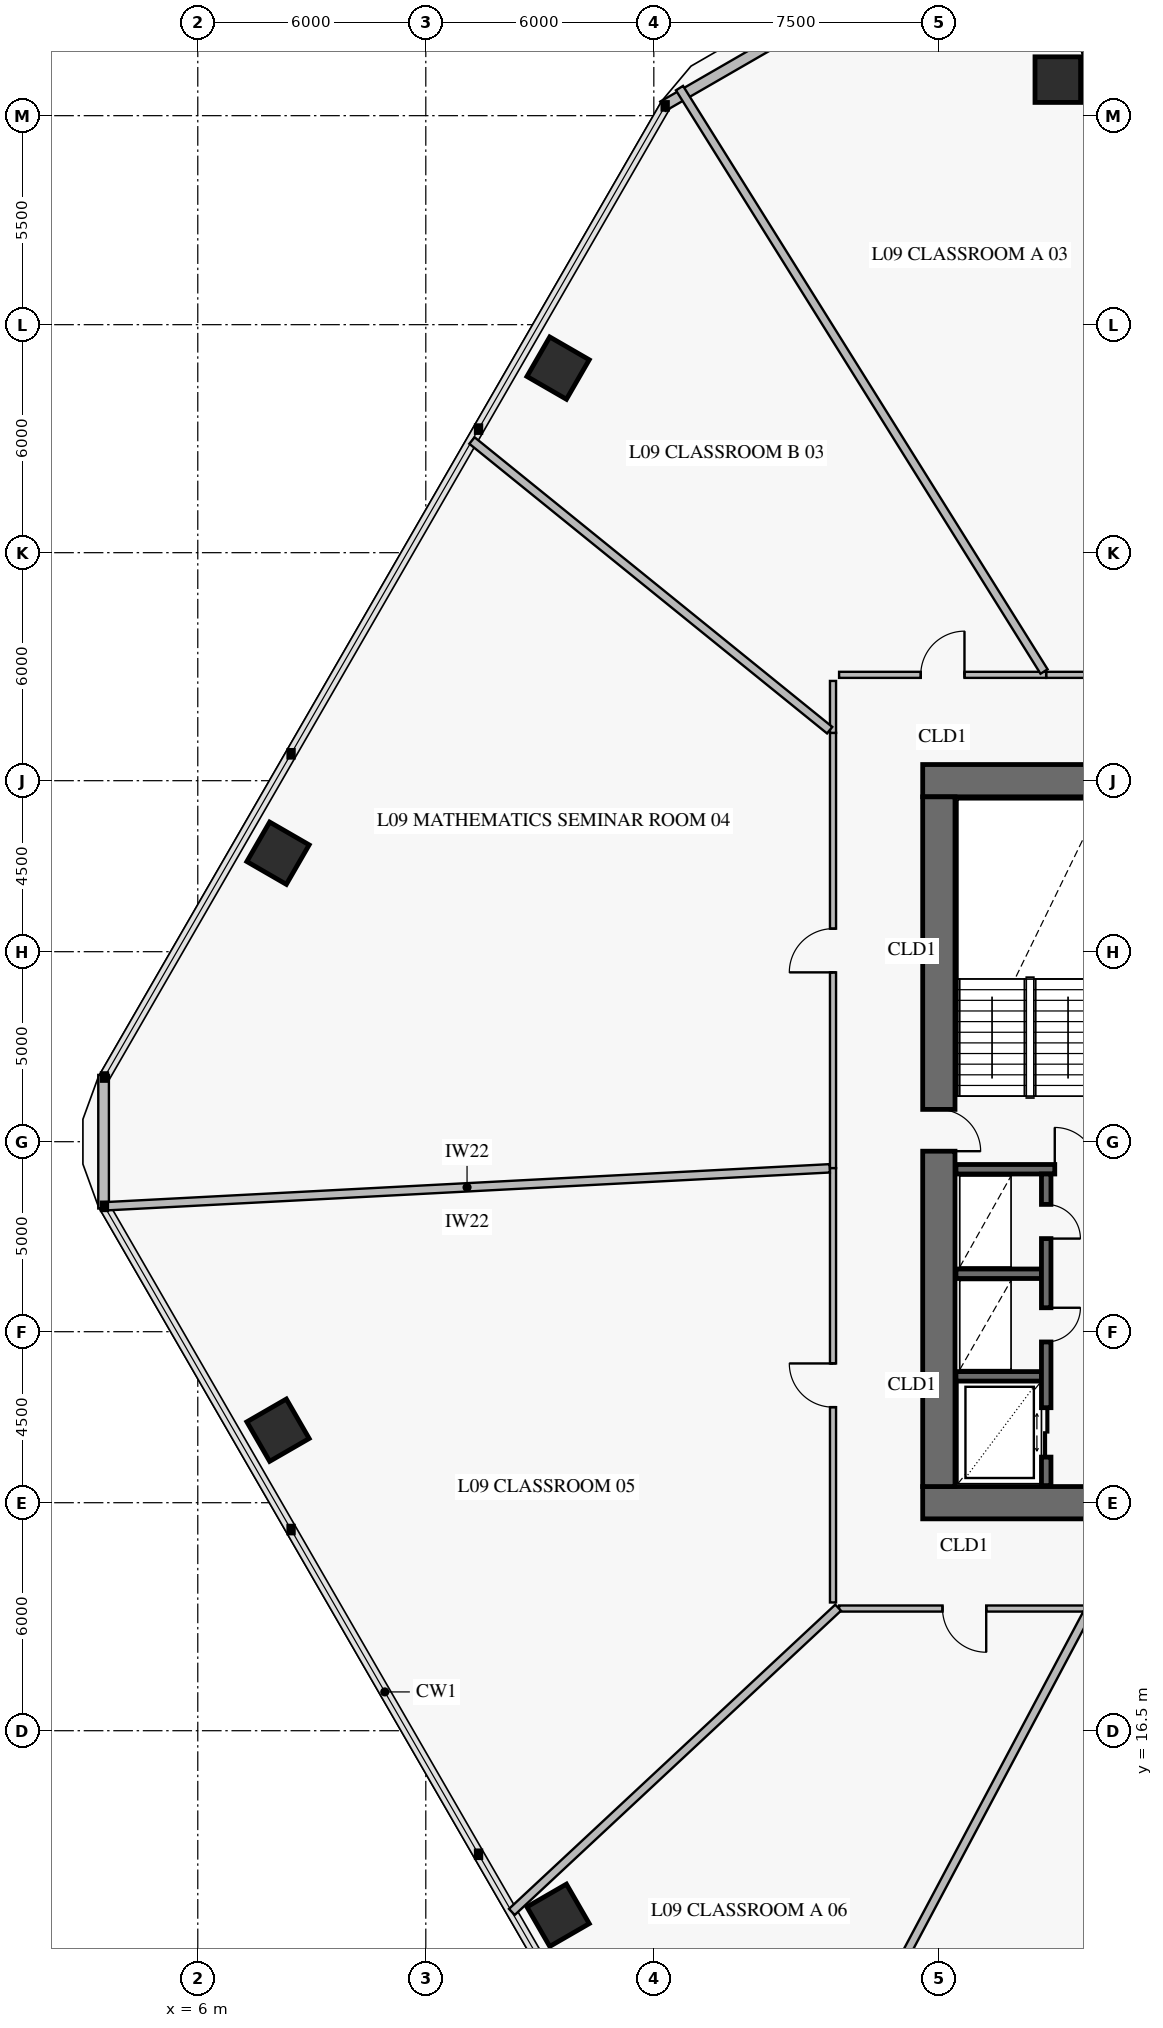
"""IFC4 building model, lengths in metres.
Left out: names, types, materials, properties, quantities, classifications, styles, units other than length and angle.
Written with IfcOpenShell. Run it as: python <this file> out.ifc"""

import sys

from ifc_helpers import new_model, si_unit, direction, frame, frame_2d, origin, origin_2d, place, context, subcontext, project, spatial, rectangle, extrude, element, fill, save


model = new_model("IFC4")
c1 = context("Model", 3, precision=1e-05, world=origin(), true_north=direction((0.0, 1.0)))
c2 = subcontext(c1, "Body", "Model", "MODEL_VIEW")
j1 = project(units=[si_unit("LENGTHUNIT", "METRE"), si_unit("PLANEANGLEUNIT", "RADIAN")], contexts=[c1])
p1 = place(None, origin())
s1 = spatial("IfcSite", under=j1, at=p1, CompositionType="ELEMENT")
p2 = place(p1, origin())
s2 = spatial("IfcBuilding", under=s1, at=p2, CompositionType="ELEMENT")
p3 = place(p2, frame((0.0, 0.0, 37.2)))
s3 = spatial("IfcBuildingStorey", under=s2, at=p3, CompositionType="ELEMENT", Elevation=37.2)
p4 = place(p3, frame((25.075, 22.5, 0.0), z_axis=(0.0, 0.0, 1.0), x_axis=(1.0, 0.0, 0.0)))
e1 = element("IfcWall", 1, at=p4, inside=s3, PredefinedType="SHEAR", context=c2, shape_type="SweptSolid", body=[
    extrude(rectangle(XDim=9.975, YDim=0.85, at=frame_2d((4.988, 0.0))), origin(), (0.0, 0.0, 1.0), 4.2),
])
p5 = place(p4, frame((4.325, 0.0, 0.0)))
e2 = element("IfcOpeningElement", 2, at=p5, cuts=e1, PredefinedType="OPENING", context=c2, shape_type="SweptSolid", body=[
    extrude(rectangle(XDim=1.5, YDim=2.15, at=frame_2d((0.75, 1.075))), frame((0.0, 0.437, 0.0), z_axis=(0.0, -1.0, 0.0), x_axis=(1.0, 0.0, 0.0)), (0.0, 0.0, 1.0), 0.874),
])
p6 = place(p3, frame((36.75, 41.5, 0.0), z_axis=(0.0, 0.0, 1.0), x_axis=(-1.0, 0.0, 0.0)))
e3 = element("IfcWall", 3, at=p6, inside=s3, PredefinedType="SHEAR", context=c2, shape_type="SweptSolid", body=[
    extrude(rectangle(XDim=11.675, YDim=0.85, at=frame_2d((5.837, 0.0))), origin(), (0.0, 0.0, 1.0), 4.2),
])
p7 = place(p6, frame((4.25, 0.0, 0.0)))
e4 = element("IfcOpeningElement", 4, at=p7, cuts=e3, PredefinedType="OPENING", context=c2, shape_type="SweptSolid", body=[
    extrude(rectangle(XDim=1.1, YDim=2.15, at=frame_2d((0.55, 1.075))), frame((0.0, 0.437, 0.0), z_axis=(0.0, -1.0, 0.0), x_axis=(1.0, 0.0, 0.0)), (0.0, 0.0, 1.0), 0.874),
])
p8 = place(p3, frame((25.5, 22.925, 0.0), z_axis=(0.0, 0.0, 1.0), x_axis=(0.0, 1.0, 0.0)))
e5 = element("IfcWall", 5, at=p8, inside=s3, PredefinedType="SHEAR", context=c2, shape_type="SweptSolid", body=[
    extrude(rectangle(XDim=18.15, YDim=0.85, at=frame_2d((9.075, 0.0))), origin(), (0.0, 0.0, 1.0), 4.2),
])
p9 = place(p8, frame((8.825, 0.0, 0.0)))
e6 = element("IfcOpeningElement", 6, at=p9, cuts=e5, PredefinedType="OPENING", context=c2, shape_type="SweptSolid", body=[
    extrude(rectangle(XDim=1.1, YDim=2.15, at=frame_2d((0.55, 1.075))), frame((0.0, 0.437, 0.0), z_axis=(0.0, -1.0, 0.0), x_axis=(1.0, 0.0, 0.0)), (0.0, 0.0, 1.0), 0.874),
])
for number, where, z_axis, x_axis in (
    (7, (28.63, 59.948, 0.0), (0.0, 0.0, 1.0), (-1.0, 0.0, 0.0)),
    (8, (15.481, 52.357, 0.0), (0.0, 0.0, 1.0), (-0.5, -0.866, 0.0)),
    (9, (8.111, 39.592, 0.0), (0.0, 0.0, 1.0), (-0.5, -0.866, 0.0)),
    (10, (8.111, 24.408, 0.0), (0.0, 0.0, 1.0), (0.5, -0.866, 0.0)),
    (11, (15.481, 11.643, 0.0), (0.0, 0.0, 1.0), (0.5, -0.866, 0.0)),
):
    element("IfcColumn", number, at=place(p3, frame(where, z_axis=z_axis, x_axis=x_axis)), inside=s3, PredefinedType="COLUMN", context=c2, shape_type="SweptSolid", body=[
        extrude(rectangle(XDim=1.2, YDim=1.2, at=origin_2d()), origin(), (0.0, 0.0, 1.0), 3.92),
    ])
p10 = place(p3, frame((3.521, 30.242, 0.0), z_axis=(0.0, 0.0, 1.0), x_axis=(0.0, 1.0, 0.0)))
e12 = element("IfcWall", 12, at=p10, inside=s3, PredefinedType="SOLIDWALL", context=c2, shape_type="SweptSolid", body=[
    extrude(rectangle(XDim=3.515, YDim=0.28, at=frame_2d((1.758, 0.0))), origin(), (0.0, 0.0, 1.0), 3.92),
])
p11 = place(p3, frame((18.239, 59.249, 0.0), z_axis=(0.0, 0.0, 1.0), x_axis=(0.866007452331, 0.500031091541, 0.0)))
e13 = element("IfcWall", 13, at=p11, inside=s3, PredefinedType="SOLIDWALL", context=c2, shape_type="SweptSolid", body=[
    extrude(rectangle(XDim=3.515, YDim=0.28, at=frame_2d((1.757, 0.0))), origin(), (0.0, 0.0, 1.0), 3.92),
])
p12 = place(p3, frame((25.95, 31.275, 0.0), z_axis=(0.0, 0.0, 1.0), x_axis=(1.0, 0.0, 0.0)))
e14 = element("IfcWall", 14, at=p12, inside=s3, PredefinedType="SOLIDWALL", context=c2, shape_type="SweptSolid", body=[
    extrude(rectangle(XDim=20.1, YDim=0.25, at=frame_2d((10.05, 0.0))), origin(), (0.0, 0.0, 1.0), 4.2),
])
p13 = place(p12, frame((2.6, 0.0, 0.0)))
e15 = element("IfcOpeningElement", 15, at=p13, cuts=e14, PredefinedType="OPENING", context=c2, shape_type="SweptSolid", body=[
    extrude(rectangle(XDim=1.1, YDim=2.15, at=frame_2d((0.55, 1.075))), frame((0.0, 0.137, 0.0), z_axis=(0.0, -1.0, 0.0), x_axis=(1.0, 0.0, 0.0)), (0.0, 0.0, 1.0), 0.274),
])
p14 = place(p12, frame((10.6, 0.0, 0.0)))
e16 = element("IfcOpeningElement", 16, at=p14, cuts=e14, PredefinedType="OPENING", context=c2, shape_type="SweptSolid", body=[
    extrude(rectangle(XDim=1.1, YDim=2.15, at=frame_2d((0.55, 1.075))), frame((0.0, 0.137, 0.0), z_axis=(0.0, -1.0, 0.0), x_axis=(1.0, 0.0, 0.0)), (0.0, 0.0, 1.0), 0.274),
])
p15 = place(p12, frame((16.35, 0.0, 0.0)))
e17 = element("IfcOpeningElement", 17, at=p15, cuts=e14, PredefinedType="OPENING", context=c2, shape_type="SweptSolid", body=[
    extrude(rectangle(XDim=1.1, YDim=2.15, at=frame_2d((0.55, 1.075))), frame((0.0, 0.137, 0.0), z_axis=(0.0, -1.0, 0.0), x_axis=(1.0, 0.0, 0.0)), (0.0, 0.0, 1.0), 0.274),
])
for number, where, z_axis, x_axis in (
    (18, (25.95, 25.825, 0.0), (0.0, 0.0, 1.0), (1.0, 0.0, 0.0)),
    (19, (25.95, 28.525, 0.0), (0.0, 0.0, 1.0), (1.0, 0.0, 0.0)),
):
    element("IfcWall", number, at=place(p3, frame(where, z_axis=z_axis, x_axis=x_axis)), inside=s3, PredefinedType="SOLIDWALL", context=c2, shape_type="SweptSolid", body=[
        extrude(rectangle(XDim=2.25, YDim=0.25, at=frame_2d((1.125, 0.0))), origin(), (0.0, 0.0, 1.0), 4.2),
    ])
p16 = place(p3, frame((28.325, 22.95, 0.0), z_axis=(0.0, 0.0, 1.0), x_axis=(0.0, 1.0, 0.0)))
e20 = element("IfcWall", 20, at=p16, inside=s3, PredefinedType="SOLIDWALL", context=c2, shape_type="SweptSolid", body=[
    extrude(rectangle(XDim=8.2, YDim=0.25, at=frame_2d((4.1, 0.0))), origin(), (0.0, 0.0, 1.0), 4.2),
])
p17 = place(p16, frame((0.75, 0.0, 0.0)))
e21 = element("IfcOpeningElement", 21, at=p17, cuts=e20, PredefinedType="OPENING", context=c2, shape_type="SweptSolid", body=[
    extrude(rectangle(XDim=1.3, YDim=2.3, at=frame_2d((0.65, 1.15))), frame((0.0, 0.137, 0.0), z_axis=(0.0, -1.0, 0.0), x_axis=(1.0, 0.0, 0.0)), (0.0, 0.0, 1.0), 0.274),
])
p18 = place(p16, frame((3.78, 0.0, 0.0)))
e22 = element("IfcOpeningElement", 22, at=p18, cuts=e20, PredefinedType="OPENING", context=c2, shape_type="SweptSolid", body=[
    extrude(rectangle(XDim=0.9, YDim=2.1, at=frame_2d((0.45, 1.05))), frame((0.0, 0.137, 0.0), z_axis=(0.0, -1.0, 0.0), x_axis=(1.0, 0.0, 0.0)), (0.0, 0.0, 1.0), 0.274),
])
p19 = place(p16, frame((6.5, 0.0, 0.0)))
e23 = element("IfcOpeningElement", 23, at=p19, cuts=e20, PredefinedType="OPENING", context=c2, shape_type="SweptSolid", body=[
    extrude(rectangle(XDim=0.9, YDim=2.1, at=frame_2d((0.45, 1.05))), frame((0.0, 0.137, 0.0), z_axis=(0.0, -1.0, 0.0), x_axis=(1.0, 0.0, 0.0)), (0.0, 0.0, 1.0), 0.274),
])
p20 = place(p3, frame((33.164, 44.285, 0.0), z_axis=(0.0, 0.0, 1.0), x_axis=(-1.0, 0.0, 0.0)))
e24 = element("IfcWall", 24, at=p20, inside=s3, PredefinedType="PARTITIONING", context=c2, shape_type="SweptSolid", body=[
    extrude(rectangle(XDim=4.84, YDim=0.16, at=frame_2d((2.42, 0.0))), origin(), (0.0, 0.0, 1.0), 3.22),
])
p21 = place(p20, frame((1.845, 0.0, 0.0)))
e25 = element("IfcOpeningElement", 25, at=p21, cuts=e24, PredefinedType="OPENING", context=c2, shape_type="SweptSolid", body=[
    extrude(rectangle(XDim=1.15, YDim=2.2, at=frame_2d((0.575, 1.1))), frame((0.0, 0.092, 0.0), z_axis=(0.0, -1.0, 0.0), x_axis=(1.0, 0.0, 0.0)), (0.0, 0.0, 1.0), 0.184),
])
p22 = place(p3, frame((28.323, 44.285, 0.0), z_axis=(0.0, 0.0, 1.0), x_axis=(-1.0, 0.0, 0.0)))
e26 = element("IfcWall", 26, at=p22, inside=s3, PredefinedType="PARTITIONING", context=c2, shape_type="SweptSolid", body=[
    extrude(rectangle(XDim=5.448, YDim=0.16, at=frame_2d((2.724, 0.0))), origin(), (0.0, 0.0, 1.0), 3.22),
])
p23 = place(p22, frame((2.149, 0.0, 0.0)))
e27 = element("IfcOpeningElement", 27, at=p23, cuts=e26, PredefinedType="OPENING", context=c2, shape_type="SweptSolid", body=[
    extrude(rectangle(XDim=1.15, YDim=2.2, at=frame_2d((0.575, 1.1))), frame((0.0, 0.092, 0.0), z_axis=(0.0, -1.0, 0.0), x_axis=(1.0, 0.0, 0.0)), (0.0, 0.0, 1.0), 0.184),
])
p24 = place(p3, frame((22.715, 42.758, 0.0), z_axis=(0.0, 0.0, 1.0), x_axis=(0.0, -1.0, 0.0)))
e28 = element("IfcWall", 28, at=p24, inside=s3, PredefinedType="PARTITIONING", context=c2, shape_type="SweptSolid", body=[
    extrude(rectangle(XDim=11.454, YDim=0.16, at=frame_2d((5.727, 0.0))), origin(), (0.0, 0.0, 1.0), 3.22),
])
p25 = place(p24, frame((5.152, 0.0, 0.0)))
e29 = element("IfcOpeningElement", 29, at=p25, cuts=e28, PredefinedType="OPENING", context=c2, shape_type="SweptSolid", body=[
    extrude(rectangle(XDim=1.15, YDim=2.2, at=frame_2d((0.575, 1.1))), frame((0.0, 0.092, 0.0), z_axis=(0.0, -1.0, 0.0), x_axis=(1.0, 0.0, 0.0)), (0.0, 0.0, 1.0), 0.184),
])
p26 = place(p3, frame((22.715, 31.304, 0.0), z_axis=(0.0, 0.0, 1.0), x_axis=(0.0, -1.0, 0.0)))
e30 = element("IfcWall", 30, at=p26, inside=s3, PredefinedType="PARTITIONING", context=c2, shape_type="SweptSolid", body=[
    extrude(rectangle(XDim=11.429, YDim=0.16, at=frame_2d((5.714, 0.0))), origin(), (0.0, 0.0, 1.0), 3.22),
])
p27 = place(p26, frame((5.139, 0.0, 0.0)))
e31 = element("IfcOpeningElement", 31, at=p27, cuts=e30, PredefinedType="OPENING", context=c2, shape_type="SweptSolid", body=[
    extrude(rectangle(XDim=1.15, YDim=2.2, at=frame_2d((0.575, 1.1))), frame((0.0, 0.092, 0.0), z_axis=(0.0, -1.0, 0.0), x_axis=(1.0, 0.0, 0.0)), (0.0, 0.0, 1.0), 0.184),
])
p28 = place(p3, frame((22.875, 19.715, 0.0), z_axis=(0.0, 0.0, 1.0), x_axis=(1.0, 0.0, 0.0)))
e32 = element("IfcWall", 32, at=p28, inside=s3, PredefinedType="PARTITIONING", context=c2, shape_type="SweptSolid", body=[
    extrude(rectangle(XDim=6.593, YDim=0.16, at=frame_2d((3.296, 0.0))), origin(), (0.0, 0.0, 1.0), 3.22),
])
p29 = place(p28, frame((2.721, 0.0, 0.0)))
e33 = element("IfcOpeningElement", 33, at=p29, cuts=e32, PredefinedType="OPENING", context=c2, shape_type="SweptSolid", body=[
    extrude(rectangle(XDim=1.15, YDim=2.2, at=frame_2d((0.575, 1.1))), frame((0.0, 0.092, 0.0), z_axis=(0.0, -1.0, 0.0), x_axis=(1.0, 0.0, 0.0)), (0.0, 0.0, 1.0), 0.184),
])
p30 = place(p3, frame((33.144, 44.373, 0.0), z_axis=(0.0, 0.0, 1.0), x_axis=(-0.224953781902, 0.974369435075, 0.0)))
e34 = element("IfcWall", 34, at=p30, inside=s3, PredefinedType="PARTITIONING", context=c2, shape_type="SweptSolid", body=[
    extrude(rectangle(XDim=17.022, YDim=0.22, at=frame_2d((8.511, 0.0))), origin(), (0.0, 0.0, 1.0), 3.17),
])
p31 = place(p3, frame((28.269, 44.373, 0.0), z_axis=(0.0, 0.0, 1.0), x_axis=(-0.529928627855, 0.848042245044, 0.0)))
e35 = element("IfcWall", 35, at=p31, inside=s3, PredefinedType="PARTITIONING", context=c2, shape_type="SweptSolid", body=[
    extrude(rectangle(XDim=18.103, YDim=0.22, at=frame_2d((9.052, 0.0))), origin(), (0.0, 0.0, 1.0), 3.17),
])
p32 = place(p3, frame((22.715, 44.125, 0.0), z_axis=(0.0, 0.0, 1.0), x_axis=(0.0, -1.0, 0.0)))
e36 = element("IfcWall", 36, at=p32, inside=s3, PredefinedType="PARTITIONING", context=c2, shape_type="SweptSolid", body=[
    extrude(rectangle(XDim=1.367, YDim=0.16, at=frame_2d((0.684, 0.0))), origin(), (0.0, 0.0, 1.0), 3.92),
])
p33 = place(p3, frame((22.627, 42.829, 0.0), z_axis=(0.0, 0.0, 1.0), x_axis=(-0.777142055765, 0.629325214147, 0.0)))
e37 = element("IfcWall", 37, at=p33, inside=s3, PredefinedType="PARTITIONING", context=c2, shape_type="SweptSolid", body=[
    extrude(rectangle(XDim=12.112, YDim=0.22, at=frame_2d((6.056, 0.0))), origin(), (0.0, 0.0, 1.0), 3.17),
])
p34 = place(p3, frame((22.627, 31.299, 0.0), z_axis=(0.0, 0.0, 1.0), x_axis=(-0.99862983793, -0.052330170999, 0.0)))
e38 = element("IfcWall", 38, at=p34, inside=s3, PredefinedType="PARTITIONING", context=c2, shape_type="SweptSolid", body=[
    extrude(rectangle(XDim=19.109, YDim=0.22, at=frame_2d((9.555, 0.0))), origin(), (0.0, 0.0, 1.0), 3.17),
])
p35 = place(p3, frame((22.85, 19.737, 0.0), z_axis=(0.0, 0.0, 1.0), x_axis=(-0.731360864489, -0.681990678744, 0.0)))
e39 = element("IfcWall", 39, at=p35, inside=s3, PredefinedType="PARTITIONING", context=c2, shape_type="SweptSolid", body=[
    extrude(rectangle(XDim=11.74, YDim=0.22, at=frame_2d((5.87, 0.0))), origin(), (0.0, 0.0, 1.0), 3.17),
])
p36 = place(p3, frame((29.421, 19.627, 0.0), z_axis=(0.0, 0.0, 1.0), x_axis=(-0.469469908408, -0.882948472505, 0.0)))
e40 = element("IfcWall", 40, at=p36, inside=s3, PredefinedType="PARTITIONING", context=c2, shape_type="SweptSolid", body=[
    extrude(rectangle(XDim=18.68, YDim=0.22, at=frame_2d((9.34, 0.0))), origin(), (0.0, 0.0, 1.0), 3.17),
])
p37 = place(p9, frame((1.1, 0.0, 0.0), z_axis=(0.0, 0.0, 1.0), x_axis=(-1.0, 0.0, 0.0)))
e41 = element("IfcDoor", 41, at=p37, inside=s3, OperationType="SINGLE_SWING_RIGHT", PredefinedType="USERDEFINED", context=c2, shape_type="SweptSolid", body=[
    extrude(rectangle(XDim=1.1, YDim=2.15, at=frame_2d((0.55, 1.075))), frame((0.0, 0.025, 0.0), z_axis=(0.0, -1.0, 0.0), x_axis=(1.0, 0.0, 0.0)), (0.0, 0.0, 1.0), 0.05),
])
fill(e6, e41)
p38 = place(p13, origin())
e42 = element("IfcDoor", 42, at=p38, inside=s3, OperationType="SINGLE_SWING_LEFT", PredefinedType="USERDEFINED", context=c2, shape_type="SweptSolid", body=[
    extrude(rectangle(XDim=1.1, YDim=2.15, at=frame_2d((0.55, 1.075))), frame((0.0, 0.025, 0.0), z_axis=(0.0, -1.0, 0.0), x_axis=(1.0, 0.0, 0.0)), (0.0, 0.0, 1.0), 0.05),
])
fill(e15, e42)
p39 = place(p17, frame((1.3, 0.0, 0.0), z_axis=(0.0, 0.0, 1.0), x_axis=(-1.0, 0.0, 0.0)))
e43 = element("IfcDoor", 43, at=p39, inside=s3, OperationType="DOUBLE_DOOR_SLIDING", PredefinedType="DOOR", context=c2, shape_type="SweptSolid", body=[
    extrude(rectangle(XDim=1.3, YDim=2.3, at=frame_2d((0.65, 1.15))), frame((0.0, 0.025, 0.0), z_axis=(0.0, -1.0, 0.0), x_axis=(1.0, 0.0, 0.0)), (0.0, 0.0, 1.0), 0.05),
])
fill(e21, e43)
p40 = place(p18, frame((0.9, 0.0, 0.0), z_axis=(0.0, 0.0, 1.0), x_axis=(-1.0, 0.0, 0.0)))
e44 = element("IfcDoor", 44, at=p40, inside=s3, OperationType="SINGLE_SWING_LEFT", PredefinedType="DOOR", context=c2, shape_type="SweptSolid", body=[
    extrude(rectangle(XDim=0.9, YDim=2.1, at=frame_2d((0.45, 1.05))), frame((0.0, 0.025, 0.0), z_axis=(0.0, -1.0, 0.0), x_axis=(1.0, 0.0, 0.0)), (0.0, 0.0, 1.0), 0.05),
])
fill(e22, e44)
p41 = place(p19, frame((0.9, 0.0, 0.0), z_axis=(0.0, 0.0, 1.0), x_axis=(-1.0, 0.0, 0.0)))
e45 = element("IfcDoor", 45, at=p41, inside=s3, OperationType="SINGLE_SWING_RIGHT", PredefinedType="DOOR", context=c2, shape_type="SweptSolid", body=[
    extrude(rectangle(XDim=0.9, YDim=2.1, at=frame_2d((0.45, 1.05))), frame((0.0, 0.025, 0.0), z_axis=(0.0, -1.0, 0.0), x_axis=(1.0, 0.0, 0.0)), (0.0, 0.0, 1.0), 0.05),
])
fill(e23, e45)
p42 = place(p23, frame((1.15, 0.0, 0.0), z_axis=(0.0, 0.0, 1.0), x_axis=(-1.0, 0.0, 0.0)))
e46 = element("IfcDoor", 46, at=p42, inside=s3, OperationType="SINGLE_SWING_RIGHT", PredefinedType="DOOR", context=c2, shape_type="SweptSolid", body=[
    extrude(rectangle(XDim=1.15, YDim=2.2, at=frame_2d((0.575, 1.1))), frame((0.0, 0.025, 0.0), z_axis=(0.0, -1.0, 0.0), x_axis=(1.0, 0.0, 0.0)), (0.0, 0.0, 1.0), 0.05),
])
fill(e27, e46)
p43 = place(p25, frame((1.15, 0.0, 0.0), z_axis=(0.0, 0.0, 1.0), x_axis=(-1.0, 0.0, 0.0)))
e47 = element("IfcDoor", 47, at=p43, inside=s3, OperationType="SINGLE_SWING_LEFT", PredefinedType="DOOR", context=c2, shape_type="SweptSolid", body=[
    extrude(rectangle(XDim=1.15, YDim=2.2, at=frame_2d((0.575, 1.1))), frame((0.0, 0.025, 0.0), z_axis=(0.0, -1.0, 0.0), x_axis=(1.0, 0.0, 0.0)), (0.0, 0.0, 1.0), 0.05),
])
fill(e29, e47)
p44 = place(p27, frame((1.15, 0.0, 0.0), z_axis=(0.0, 0.0, 1.0), x_axis=(-1.0, 0.0, 0.0)))
e48 = element("IfcDoor", 48, at=p44, inside=s3, OperationType="SINGLE_SWING_RIGHT", PredefinedType="DOOR", context=c2, shape_type="SweptSolid", body=[
    extrude(rectangle(XDim=1.15, YDim=2.2, at=frame_2d((0.575, 1.1))), frame((0.0, 0.025, 0.0), z_axis=(0.0, -1.0, 0.0), x_axis=(1.0, 0.0, 0.0)), (0.0, 0.0, 1.0), 0.05),
])
fill(e31, e48)
p45 = place(p29, frame((1.15, 0.0, 0.0), z_axis=(0.0, 0.0, 1.0), x_axis=(-1.0, 0.0, 0.0)))
e49 = element("IfcDoor", 49, at=p45, inside=s3, OperationType="SINGLE_SWING_LEFT", PredefinedType="DOOR", context=c2, shape_type="SweptSolid", body=[
    extrude(rectangle(XDim=1.15, YDim=2.2, at=frame_2d((0.575, 1.1))), frame((0.0, 0.025, 0.0), z_axis=(0.0, -1.0, 0.0), x_axis=(1.0, 0.0, 0.0)), (0.0, 0.0, 1.0), 0.05),
])
fill(e33, e49)
save(model, sys.argv[1])
